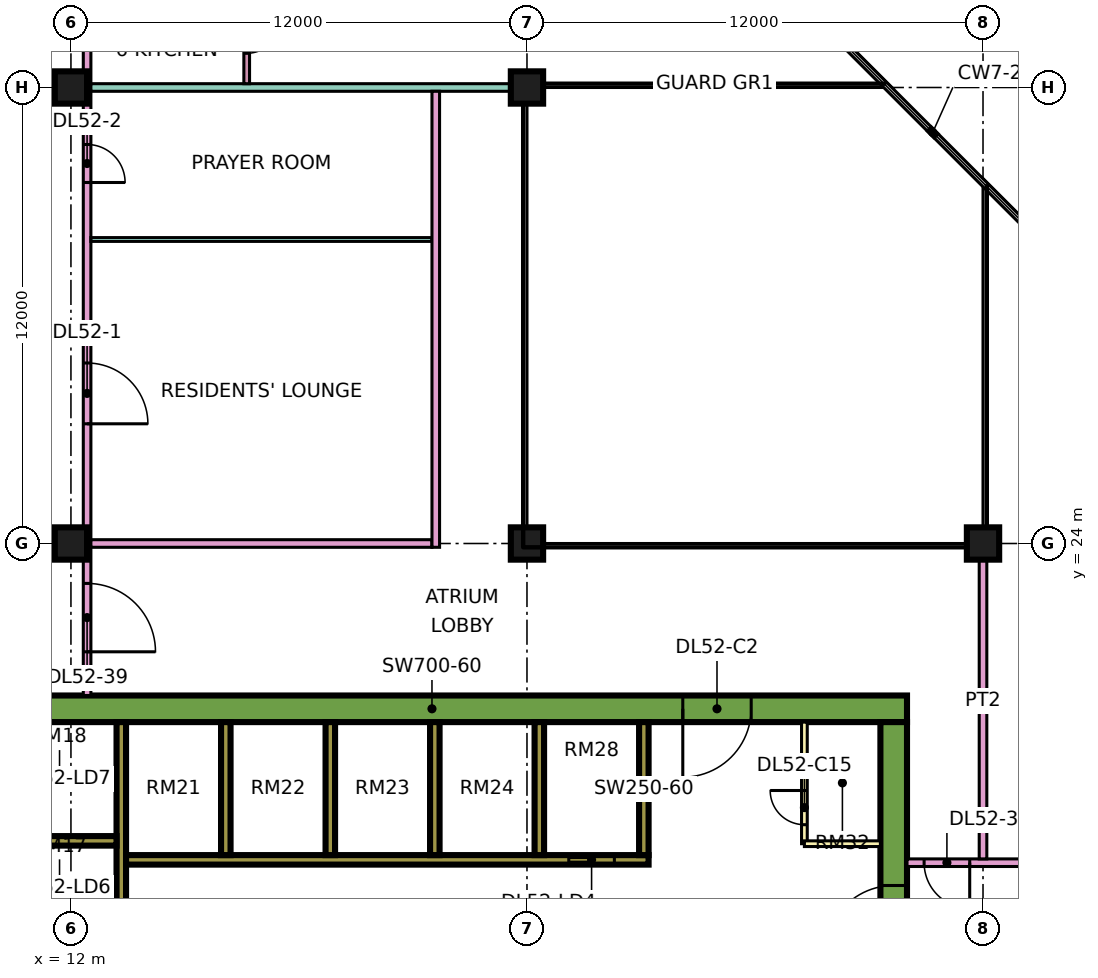
"""IFC4 building model, lengths in metres.
Left out: names, types, materials, properties, quantities, classifications, styles, units other than length and angle.
Written with IfcOpenShell. Run it as: python <this file> out.ifc"""

import sys

from ifc_helpers import new_model, si_unit, direction, frame, frame_2d, origin, origin_2d, place, context, subcontext, project, spatial, rectangle, extrude, element, fill, save


model = new_model("IFC4")
c1 = context("Model", 3, precision=1e-05, world=origin(), true_north=direction((0.0, 1.0)))
c2 = subcontext(c1, "Body", "Model", "MODEL_VIEW")
j1 = project(units=[si_unit("LENGTHUNIT", "METRE"), si_unit("PLANEANGLEUNIT", "RADIAN")], contexts=[c1])
p1 = place(None, origin())
s1 = spatial("IfcSite", under=j1, at=p1, CompositionType="ELEMENT")
p2 = place(p1, origin())
s2 = spatial("IfcBuilding", under=s1, at=p2, CompositionType="ELEMENT")
p3 = place(p2, frame((0.0, 0.0, 222.9)))
s3 = spatial("IfcBuildingStorey", under=s2, at=p3, CompositionType="ELEMENT", Elevation=222.9)
for number, where, z_axis, x_axis in (
    (1, (12.0, 24.0, 0.0), (0.0, 0.0, 1.0), (1.0, 0.0, 0.0)),
    (2, (12.0, 36.0, 0.0), (0.0, 0.0, 1.0), (1.0, 0.0, 0.0)),
    (3, (24.0, 24.0, 0.0), (0.0, 0.0, 1.0), (1.0, 0.0, 0.0)),
    (4, (24.0, 36.0, 0.0), (0.0, 0.0, 1.0), (1.0, 0.0, 0.0)),
    (5, (36.0, 24.0, 0.0), (0.0, 0.0, 1.0), (1.0, 0.0, 0.0)),
):
    element("IfcColumn", number, at=place(p3, frame(where, z_axis=z_axis, x_axis=x_axis)), inside=s3, PredefinedType="COLUMN", context=c2, shape_type="SweptSolid", body=[
        extrude(rectangle(XDim=0.85, YDim=0.85, at=origin_2d()), origin(), (0.0, 0.0, 1.0), 3.75),
    ])
p4 = place(p3, frame((9.0, 19.65, 0.0), z_axis=(0.0, 0.0, 1.0), x_axis=(1.0, 0.0, 0.0)))
e6 = element("IfcWall", 6, at=p4, inside=s3, PredefinedType="SHEAR", context=c2, shape_type="SweptSolid", body=[
    extrude(rectangle(XDim=25.0, YDim=0.7, at=frame_2d((12.5, 0.0))), origin(), (0.0, 0.0, 1.0), 3.75),
])
p5 = place(p4, frame((19.1, 0.0, 0.0)))
e7 = element("IfcOpeningElement", 7, at=p5, cuts=e6, PredefinedType="OPENING", context=c2, shape_type="SweptSolid", body=[
    extrude(rectangle(XDim=1.8, YDim=2.4, at=frame_2d((0.9, 1.2))), frame((0.0, 0.36, 0.0), z_axis=(0.0, -1.0, 0.0), x_axis=(1.0, 0.0, 0.0)), (0.0, 0.0, 1.0), 0.72),
])
p6 = place(p3, frame((33.65, 7.7, 0.0), z_axis=(0.0, 0.0, 1.0), x_axis=(0.0, 1.0, 0.0)))
e8 = element("IfcWall", 8, at=p6, inside=s3, PredefinedType="SHEAR", context=c2, shape_type="SweptSolid", body=[
    extrude(rectangle(XDim=11.6, YDim=0.7, at=frame_2d((5.8, 0.0))), origin(), (0.0, 0.0, 1.0), 3.75),
])
p7 = place(p6, frame((5.5, 0.0, 0.0)))
e9 = element("IfcOpeningElement", 9, at=p7, cuts=e8, PredefinedType="OPENING", context=c2, shape_type="SweptSolid", body=[
    extrude(rectangle(XDim=1.8, YDim=2.4, at=frame_2d((0.9, 1.2))), frame((0.0, 0.36, 0.0), z_axis=(0.0, -1.0, 0.0), x_axis=(1.0, 0.0, 0.0)), (0.0, 0.0, 1.0), 0.72),
])
p8 = place(p3, frame((13.325, 7.7, 0.0), z_axis=(0.0, 0.0, 1.0), x_axis=(0.0, 1.0, 0.0)))
e10 = element("IfcWall", 10, at=p8, inside=s3, PredefinedType="SHEAR", context=c2, shape_type="SweptSolid", body=[
    extrude(rectangle(XDim=11.6, YDim=0.25, at=frame_2d((5.8, 0.0))), origin(), (0.0, 0.0, 1.0), 3.75),
])
p9 = place(p3, frame((13.45, 15.675, 0.0), z_axis=(0.0, 0.0, 1.0), x_axis=(1.0, 0.0, 0.0)))
e11 = element("IfcWall", 11, at=p9, inside=s3, PredefinedType="SHEAR", context=c2, shape_type="SweptSolid", body=[
    extrude(rectangle(XDim=13.75, YDim=0.25, at=frame_2d((6.875, 0.0))), origin(), (0.0, 0.0, 1.0), 3.75),
])
p10 = place(p9, frame((11.65, 0.0, 0.0)))
e12 = element("IfcOpeningElement", 12, at=p10, cuts=e11, PredefinedType="OPENING", context=c2, shape_type="SweptSolid", body=[
    extrude(rectangle(XDim=1.2, YDim=2.2, at=frame_2d((0.6, 1.1))), frame((0.0, 0.135, 0.0), z_axis=(0.0, -1.0, 0.0), x_axis=(1.0, 0.0, 0.0)), (0.0, 0.0, 1.0), 0.27),
])
p11 = place(p3, frame((10.2, 16.175, 0.0), z_axis=(0.0, 0.0, 1.0), x_axis=(1.0, 0.0, 0.0)))
e13 = element("IfcWall", 13, at=p11, inside=s3, PredefinedType="SHEAR", context=c2, shape_type="SweptSolid", body=[
    extrude(rectangle(XDim=3.0, YDim=0.25, at=frame_2d((1.5, 0.0))), origin(), (0.0, 0.0, 1.0), 3.75),
])
for number, where, z_axis, x_axis in (
    (14, (16.075, 15.8, 0.0), (0.0, 0.0, 1.0), (0.0, 1.0, 0.0)),
    (15, (18.825, 15.8, 0.0), (0.0, 0.0, 1.0), (0.0, 1.0, 0.0)),
    (16, (21.575, 15.8, 0.0), (0.0, 0.0, 1.0), (0.0, 1.0, 0.0)),
    (17, (24.325, 15.8, 0.0), (0.0, 0.0, 1.0), (0.0, 1.0, 0.0)),
    (18, (27.075, 15.8, 0.0), (0.0, 0.0, 1.0), (0.0, 1.0, 0.0)),
):
    element("IfcWall", number, at=place(p3, frame(where, z_axis=z_axis, x_axis=x_axis)), inside=s3, PredefinedType="SHEAR", context=c2, shape_type="SweptSolid", body=[
        extrude(rectangle(XDim=3.5, YDim=0.25, at=frame_2d((1.75, 0.0))), origin(), (0.0, 0.0, 1.0), 3.75),
    ])
p12 = place(p3, frame((31.3, 16.1, 0.0), z_axis=(0.0, 0.0, 1.0), x_axis=(0.0, 1.0, 0.0)))
e19 = element("IfcWall", 19, at=p12, inside=s3, PredefinedType="PARTITIONING", context=c2, shape_type="SweptSolid", body=[
    extrude(rectangle(XDim=3.2, YDim=0.15, at=frame_2d((1.6, 0.0))), origin(), (0.0, 0.0, 1.0), 3.35),
])
p13 = place(p12, frame((0.5, 0.0, 0.0)))
e20 = element("IfcOpeningElement", 20, at=p13, cuts=e19, PredefinedType="OPENING", context=c2, shape_type="SweptSolid", body=[
    extrude(rectangle(XDim=0.9, YDim=2.1, at=frame_2d((0.45, 1.05))), frame((0.0, 0.085, 0.0), z_axis=(0.0, -1.0, 0.0), x_axis=(1.0, 0.0, 0.0)), (0.0, 0.0, 1.0), 0.17),
])
p14 = place(p3, frame((31.3, 16.1, 0.0), z_axis=(0.0, 0.0, 1.0), x_axis=(1.0, 0.0, 0.0)))
e21 = element("IfcWall", 21, at=p14, inside=s3, PredefinedType="PARTITIONING", context=c2, shape_type="SweptSolid", body=[
    extrude(rectangle(XDim=2.0, YDim=0.15, at=frame_2d((1.0, 0.0))), origin(), (0.0, 0.0, 1.0), 3.35),
])
p15 = place(p3, frame((12.425, 20.0, 0.0), z_axis=(0.0, 0.0, 1.0), x_axis=(0.0, 1.0, 0.0)))
e22 = element("IfcWall", 22, at=p15, inside=s3, PredefinedType="PARTITIONING", context=c2, shape_type="SweptSolid", body=[
    extrude(rectangle(XDim=43.0, YDim=0.2, at=frame_2d((21.5, 0.0))), origin(), (0.0, 0.0, 1.0), 3.35),
])
p16 = place(p15, frame((7.15, 0.0, 0.0)))
e23 = element("IfcOpeningElement", 23, at=p16, cuts=e22, PredefinedType="OPENING", context=c2, shape_type="SweptSolid", body=[
    extrude(rectangle(XDim=1.6, YDim=2.1, at=frame_2d((0.8, 1.05))), frame((0.0, 0.11, 0.0), z_axis=(0.0, -1.0, 0.0), x_axis=(1.0, 0.0, 0.0)), (0.0, 0.0, 1.0), 0.22),
])
p17 = place(p15, frame((13.5, 0.0, 0.0)))
e24 = element("IfcOpeningElement", 24, at=p17, cuts=e22, PredefinedType="OPENING", context=c2, shape_type="SweptSolid", body=[
    extrude(rectangle(XDim=1.0, YDim=2.1, at=frame_2d((0.5, 1.05))), frame((0.0, 0.11, 0.0), z_axis=(0.0, -1.0, 0.0), x_axis=(1.0, 0.0, 0.0)), (0.0, 0.0, 1.0), 0.22),
])
p18 = place(p15, frame((22.9, 0.0, 0.0)))
e25 = element("IfcOpeningElement", 25, at=p18, cuts=e22, PredefinedType="OPENING", context=c2, shape_type="SweptSolid", body=[
    extrude(rectangle(XDim=1.0, YDim=2.1, at=frame_2d((0.5, 1.05))), frame((0.0, 0.11, 0.0), z_axis=(0.0, -1.0, 0.0), x_axis=(1.0, 0.0, 0.0)), (0.0, 0.0, 1.0), 0.22),
])
p19 = place(p15, frame((35.35, 0.0, 0.0)))
e26 = element("IfcOpeningElement", 26, at=p19, cuts=e22, PredefinedType="OPENING", context=c2, shape_type="SweptSolid", body=[
    extrude(rectangle(XDim=1.0, YDim=2.1, at=frame_2d((0.5, 1.05))), frame((0.0, 0.11, 0.0), z_axis=(0.0, -1.0, 0.0), x_axis=(1.0, 0.0, 0.0)), (0.0, 0.0, 1.0), 0.22),
])
p20 = place(p15, frame((1.15, 0.0, 0.0)))
e27 = element("IfcOpeningElement", 27, at=p20, cuts=e22, PredefinedType="OPENING", context=c2, shape_type="SweptSolid", body=[
    extrude(rectangle(XDim=1.8, YDim=2.1, at=frame_2d((0.9, 1.05))), frame((0.0, 0.11, 0.0), z_axis=(0.0, -1.0, 0.0), x_axis=(1.0, 0.0, 0.0)), (0.0, 0.0, 1.0), 0.22),
])
p21 = place(p15, frame((28.6, 0.0, 0.0)))
e28 = element("IfcOpeningElement", 28, at=p21, cuts=e22, PredefinedType="OPENING", context=c2, shape_type="SweptSolid", body=[
    extrude(rectangle(XDim=1.8, YDim=2.1, at=frame_2d((0.9, 1.05))), frame((0.0, 0.11, 0.0), z_axis=(0.0, -1.0, 0.0), x_axis=(1.0, 0.0, 0.0)), (0.0, 0.0, 1.0), 0.22),
])
p22 = place(p3, frame((12.525, 24.0, 0.0), z_axis=(0.0, 0.0, 1.0), x_axis=(1.0, 0.0, 0.0)))
e29 = element("IfcWall", 29, at=p22, inside=s3, PredefinedType="PARTITIONING", context=c2, shape_type="SweptSolid", body=[
    extrude(rectangle(XDim=8.975, YDim=0.2, at=frame_2d((4.488, 0.0))), origin(), (0.0, 0.0, 1.0), 3.35),
])
p23 = place(p3, frame((12.525, 32.0, 0.0), z_axis=(0.0, 0.0, 1.0), x_axis=(1.0, 0.0, 0.0)))
e30 = element("IfcWall", 30, at=p23, inside=s3, PredefinedType="PARTITIONING", context=c2, shape_type="SweptSolid", body=[
    extrude(rectangle(XDim=8.975, YDim=0.1, at=frame_2d((4.488, 0.0))), origin(), (0.0, 0.0, 1.0), 3.35),
])
p24 = place(p3, frame((12.525, 36.0, 0.0), z_axis=(0.0, 0.0, 1.0), x_axis=(1.0, 0.0, 0.0)))
e31 = element("IfcWall", 31, at=p24, inside=s3, PredefinedType="PARTITIONING", context=c2, shape_type="SweptSolid", body=[
    extrude(rectangle(XDim=11.475, YDim=0.2, at=frame_2d((5.738, 0.0))), origin(), (0.0, 0.0, 1.0), 3.35),
])
p25 = place(p3, frame((16.625, 36.1, 0.0), z_axis=(0.0, 0.0, 1.0), x_axis=(0.0, 1.0, 0.0)))
e32 = element("IfcWall", 32, at=p25, inside=s3, PredefinedType="PARTITIONING", context=c2, shape_type="SweptSolid", body=[
    extrude(rectangle(XDim=5.675, YDim=0.15, at=frame_2d((2.837, 0.0))), origin(), (0.0, 0.0, 1.0), 3.35),
])
p26 = place(p25, frame((0.8, 0.0, 0.0)))
e33 = element("IfcOpeningElement", 33, at=p26, cuts=e32, PredefinedType="OPENING", context=c2, shape_type="SweptSolid", body=[
    extrude(rectangle(XDim=0.9, YDim=2.1, at=frame_2d((0.45, 1.05))), frame((0.0, 0.085, 0.0), z_axis=(0.0, -1.0, 0.0), x_axis=(1.0, 0.0, 0.0)), (0.0, 0.0, 1.0), 0.17),
])
p27 = place(p3, frame((21.6, 23.9, 0.0), z_axis=(0.0, 0.0, 1.0), x_axis=(0.0, 1.0, 0.0)))
e34 = element("IfcWall", 34, at=p27, inside=s3, PredefinedType="PARTITIONING", context=c2, shape_type="SweptSolid", body=[
    extrude(rectangle(XDim=12.0, YDim=0.2, at=frame_2d((6.0, 0.0))), origin(), (0.0, 0.0, 1.0), 3.35),
])
p28 = place(p3, frame((34.0, 15.6, 0.0), z_axis=(0.0, 0.0, 1.0), x_axis=(1.0, 0.0, 0.0)))
e35 = element("IfcWall", 35, at=p28, inside=s3, PredefinedType="PARTITIONING", context=c2, shape_type="SweptSolid", body=[
    extrude(rectangle(XDim=10.35, YDim=0.2, at=frame_2d((5.175, 0.0))), origin(), (0.0, 0.0, 1.0), 3.35),
])
p29 = place(p28, frame((5.6, 0.0, 0.0)))
e36 = element("IfcOpeningElement", 36, at=p29, cuts=e35, PredefinedType="OPENING", context=c2, shape_type="SweptSolid", body=[
    extrude(rectangle(XDim=1.0, YDim=2.1, at=frame_2d((0.5, 1.05))), frame((0.0, 0.11, 0.0), z_axis=(0.0, -1.0, 0.0), x_axis=(1.0, 0.0, 0.0)), (0.0, 0.0, 1.0), 0.22),
])
p30 = place(p28, frame((0.45, 0.0, 0.0)))
e37 = element("IfcOpeningElement", 37, at=p30, cuts=e35, PredefinedType="OPENING", context=c2, shape_type="SweptSolid", body=[
    extrude(rectangle(XDim=1.2, YDim=2.1, at=frame_2d((0.6, 1.05))), frame((0.0, 0.11, 0.0), z_axis=(0.0, -1.0, 0.0), x_axis=(1.0, 0.0, 0.0)), (0.0, 0.0, 1.0), 0.22),
])
p31 = place(p3, frame((36.0, 15.7, 0.0), z_axis=(0.0, 0.0, 1.0), x_axis=(0.0, 1.0, 0.0)))
e38 = element("IfcWall", 38, at=p31, inside=s3, PredefinedType="PARTITIONING", context=c2, shape_type="SweptSolid", body=[
    extrude(rectangle(XDim=8.3, YDim=0.2, at=frame_2d((4.15, 0.0))), origin(), (0.0, 0.0, 1.0), 3.35),
])
p32 = place(p10, origin())
e39 = element("IfcDoor", 39, at=p32, inside=s3, OperationType="DOUBLE_DOOR_SLIDING", PredefinedType="DOOR", context=c2, shape_type="SweptSolid", body=[
    extrude(rectangle(XDim=1.2, YDim=2.2, at=frame_2d((0.6, 1.1))), frame((0.0, 0.025, 0.0), z_axis=(0.0, -1.0, 0.0), x_axis=(1.0, 0.0, 0.0)), (0.0, 0.0, 1.0), 0.05),
])
fill(e12, e39)
p33 = place(p7, origin())
e40 = element("IfcDoor", 40, at=p33, inside=s3, OperationType="DOUBLE_DOOR_SINGLE_SWING", PredefinedType="DOOR", context=c2, shape_type="SweptSolid", body=[
    extrude(rectangle(XDim=1.8, YDim=2.4, at=frame_2d((0.9, 1.2))), frame((0.0, 0.025, 0.0), z_axis=(0.0, -1.0, 0.0), x_axis=(1.0, 0.0, 0.0)), (0.0, 0.0, 1.0), 0.05),
])
fill(e9, e40)
p34 = place(p5, frame((1.8, 0.0, 0.0), z_axis=(0.0, 0.0, 1.0), x_axis=(-1.0, 0.0, 0.0)))
e41 = element("IfcDoor", 41, at=p34, inside=s3, OperationType="DOUBLE_DOOR_SINGLE_SWING", PredefinedType="DOOR", context=c2, shape_type="SweptSolid", body=[
    extrude(rectangle(XDim=1.8, YDim=2.4, at=frame_2d((0.9, 1.2))), frame((0.0, 0.025, 0.0), z_axis=(0.0, -1.0, 0.0), x_axis=(1.0, 0.0, 0.0)), (0.0, 0.0, 1.0), 0.05),
])
fill(e7, e41)
p35 = place(p13, frame((0.9, 0.0, 0.0), z_axis=(0.0, 0.0, 1.0), x_axis=(-1.0, 0.0, 0.0)))
e42 = element("IfcDoor", 42, at=p35, inside=s3, OperationType="SINGLE_SWING_RIGHT", PredefinedType="DOOR", context=c2, shape_type="SweptSolid", body=[
    extrude(rectangle(XDim=0.9, YDim=2.1, at=frame_2d((0.45, 1.05))), frame((0.0, 0.025, 0.0), z_axis=(0.0, -1.0, 0.0), x_axis=(1.0, 0.0, 0.0)), (0.0, 0.0, 1.0), 0.05),
])
fill(e20, e42)
p36 = place(p16, frame((1.6, 0.0, 0.0), z_axis=(0.0, 0.0, 1.0), x_axis=(-1.0, 0.0, 0.0)))
e43 = element("IfcDoor", 43, at=p36, inside=s3, OperationType="DOUBLE_DOOR_SINGLE_SWING", PredefinedType="DOOR", context=c2, shape_type="SweptSolid", body=[
    extrude(rectangle(XDim=1.6, YDim=2.1, at=frame_2d((0.8, 1.05))), frame((0.0, 0.025, 0.0), z_axis=(0.0, -1.0, 0.0), x_axis=(1.0, 0.0, 0.0)), (0.0, 0.0, 1.0), 0.05),
])
fill(e23, e43)
p37 = place(p17, frame((1.0, 0.0, 0.0), z_axis=(0.0, 0.0, 1.0), x_axis=(-1.0, 0.0, 0.0)))
e44 = element("IfcDoor", 44, at=p37, inside=s3, OperationType="SINGLE_SWING_LEFT", PredefinedType="DOOR", context=c2, shape_type="SweptSolid", body=[
    extrude(rectangle(XDim=1.0, YDim=2.1, at=frame_2d((0.5, 1.05))), frame((0.0, 0.025, 0.0), z_axis=(0.0, -1.0, 0.0), x_axis=(1.0, 0.0, 0.0)), (0.0, 0.0, 1.0), 0.05),
])
fill(e24, e44)
p38 = place(p26, origin())
e45 = element("IfcDoor", 45, at=p38, inside=s3, OperationType="SINGLE_SWING_RIGHT", PredefinedType="DOOR", context=c2, shape_type="SweptSolid", body=[
    extrude(rectangle(XDim=0.9, YDim=2.1, at=frame_2d((0.45, 1.05))), frame((0.0, 0.025, 0.0), z_axis=(0.0, -1.0, 0.0), x_axis=(1.0, 0.0, 0.0)), (0.0, 0.0, 1.0), 0.05),
])
fill(e33, e45)
p39 = place(p30, origin())
e46 = element("IfcDoor", 46, at=p39, inside=s3, OperationType="SINGLE_SWING_RIGHT", PredefinedType="DOOR", context=c2, shape_type="SweptSolid", body=[
    extrude(rectangle(XDim=1.2, YDim=2.1, at=frame_2d((0.6, 1.05))), frame((0.0, 0.025, 0.0), z_axis=(0.0, -1.0, 0.0), x_axis=(1.0, 0.0, 0.0)), (0.0, 0.0, 1.0), 0.05),
])
fill(e37, e46)
p40 = place(p20, frame((1.8, 0.0, 0.0), z_axis=(0.0, 0.0, 1.0), x_axis=(-1.0, 0.0, 0.0)))
e47 = element("IfcDoor", 47, at=p40, inside=s3, OperationType="DOUBLE_DOOR_SINGLE_SWING", PredefinedType="DOOR", context=c2, shape_type="SweptSolid", body=[
    extrude(rectangle(XDim=1.8, YDim=2.1, at=frame_2d((0.9, 1.05))), frame((0.0, 0.025, 0.0), z_axis=(0.0, -1.0, 0.0), x_axis=(1.0, 0.0, 0.0)), (0.0, 0.0, 1.0), 0.05),
])
fill(e27, e47)
save(model, sys.argv[1])
